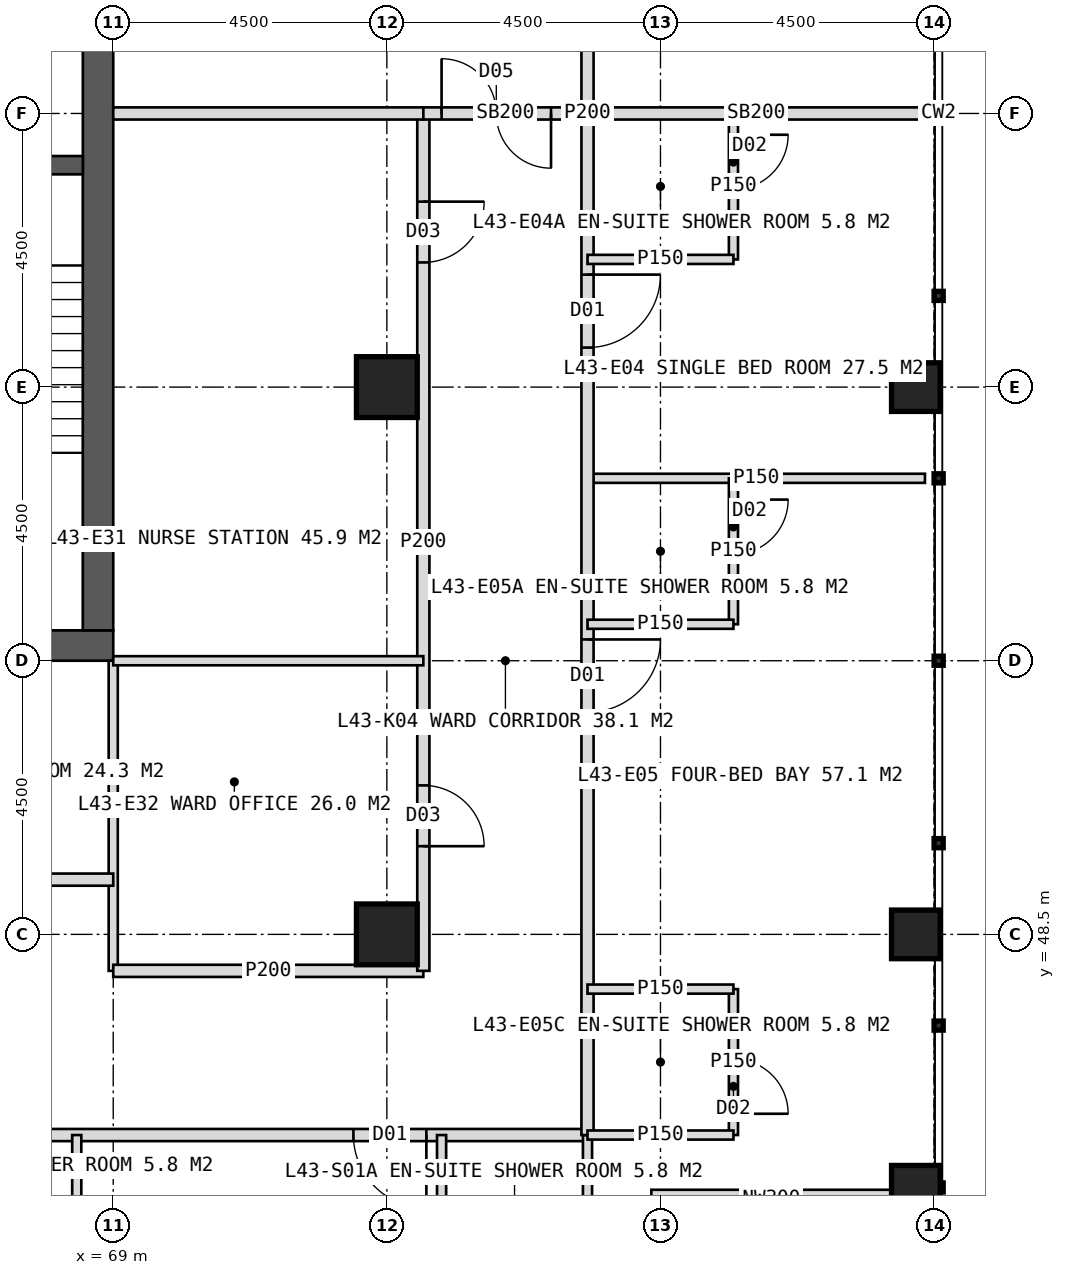
"""IFC4 building model, lengths in metres.
Left out: names, types, materials, properties, quantities, classifications, styles, units other than length and angle.
Written with IfcOpenShell. Run it as: python <this file> out.ifc"""

import sys

from ifc_helpers import new_model, si_unit, direction, frame, frame_2d, origin, origin_2d, place, context, subcontext, project, spatial, rectangle, hollow_rectangle, extrude, element, fill, save


model = new_model("IFC4")
c1 = context("Model", 3, precision=1e-05, world=origin(), true_north=direction((0.0, 1.0)))
c2 = subcontext(c1, "Body", "Model", "MODEL_VIEW")
j1 = project(units=[si_unit("LENGTHUNIT", "METRE"), si_unit("PLANEANGLEUNIT", "RADIAN")], contexts=[c1])
p1 = place(None, origin())
s1 = spatial("IfcSite", under=j1, at=p1, CompositionType="ELEMENT")
p2 = place(p1, origin())
s2 = spatial("IfcBuilding", under=s1, at=p2, CompositionType="ELEMENT")
p3 = place(p2, frame((0.0, 0.0, 181.0)))
s3 = spatial("IfcBuildingStorey", under=s2, at=p3, CompositionType="ELEMENT", Elevation=181.0)
p4 = place(p3, frame((51.0, 53.25, 0.0), z_axis=(0.0, 0.0, 1.0), x_axis=(1.0, 0.0, 0.0)))
e1 = element("IfcWall", 1, at=p4, inside=s3, PredefinedType="SHEAR", context=c2, shape_type="SweptSolid", body=[
    extrude(rectangle(XDim=18.0, YDim=0.5, at=frame_2d((9.0, 0.0))), origin(), (0.0, 0.0, 1.0), 4.0),
])
p5 = place(p4, frame((8.1, 0.0, 0.0)))
e2 = element("IfcOpeningElement", 2, at=p5, cuts=e1, PredefinedType="OPENING", context=c2, shape_type="SweptSolid", body=[
    extrude(rectangle(XDim=1.8, YDim=2.2, at=frame_2d((0.9, 1.1))), frame((0.0, 0.26, 0.0), z_axis=(0.0, -1.0, 0.0), x_axis=(1.0, 0.0, 0.0)), (0.0, 0.0, 1.0), 0.52),
])
p6 = place(p3, frame((68.75, 53.5, 0.0), z_axis=(0.0, 0.0, 1.0), x_axis=(0.0, 1.0, 0.0)))
e3 = element("IfcWall", 3, at=p6, inside=s3, PredefinedType="SHEAR", context=c2, shape_type="SweptSolid", body=[
    extrude(rectangle(XDim=17.0, YDim=0.5, at=frame_2d((8.5, 0.0))), origin(), (0.0, 0.0, 1.0), 4.0),
])
p7 = place(p6, frame((9.6, 0.0, 0.0)))
e4 = element("IfcOpeningElement", 4, at=p7, cuts=e3, PredefinedType="OPENING", context=c2, shape_type="SweptSolid", body=[
    extrude(rectangle(XDim=1.5, YDim=2.2, at=frame_2d((0.75, 1.1))), frame((0.0, 0.26, 0.0), z_axis=(0.0, -1.0, 0.0), x_axis=(1.0, 0.0, 0.0)), (0.0, 0.0, 1.0), 0.52),
])
p8 = place(p3, frame((65.2, 61.15, 0.0), z_axis=(0.0, 0.0, 1.0), x_axis=(1.0, 0.0, 0.0)))
e5 = element("IfcWall", 5, at=p8, inside=s3, PredefinedType="SHEAR", context=c2, shape_type="SweptSolid", body=[
    extrude(rectangle(XDim=3.3, YDim=0.3, at=frame_2d((1.65, 0.0))), origin(), (0.0, 0.0, 1.0), 4.0),
])
p9 = place(p8, frame((1.05, 0.0, 0.0)))
e6 = element("IfcOpeningElement", 6, at=p9, cuts=e5, PredefinedType="OPENING", context=c2, shape_type="SweptSolid", body=[
    extrude(rectangle(XDim=1.2, YDim=2.1, at=frame_2d((0.6, 1.05))), frame((0.0, 0.16, 0.0), z_axis=(0.0, -1.0, 0.0), x_axis=(1.0, 0.0, 0.0)), (0.0, 0.0, 1.0), 0.32),
])
for number, where, z_axis, x_axis in (
    (7, (73.5, 48.5, 0.0), (0.0, 0.0, 1.0), (1.0, 0.0, 0.0)),
    (8, (73.5, 57.5, 0.0), (0.0, 0.0, 1.0), (1.0, 0.0, 0.0)),
):
    element("IfcColumn", number, at=place(p3, frame(where, z_axis=z_axis, x_axis=x_axis)), inside=s3, PredefinedType="COLUMN", context=c2, shape_type="SweptSolid", body=[
        extrude(hollow_rectangle(XDim=1.0, YDim=1.0, WallThickness=0.1, at=origin_2d()), origin(), (0.0, 0.0, 1.0), 4.0),
    ])
for number, where, z_axis, x_axis in (
    (9, (82.2, 44.3, 0.0), (0.0, 0.0, 1.0), (1.0, 0.0, 0.0)),
    (10, (82.2, 48.5, 0.0), (0.0, 0.0, 1.0), (1.0, 0.0, 0.0)),
    (11, (82.2, 57.5, 0.0), (0.0, 0.0, 1.0), (1.0, 0.0, 0.0)),
):
    element("IfcColumn", number, at=place(p3, frame(where, z_axis=z_axis, x_axis=x_axis)), inside=s3, PredefinedType="COLUMN", context=c2, shape_type="SweptSolid", body=[
        extrude(hollow_rectangle(XDim=0.8, YDim=0.8, WallThickness=0.08, at=origin_2d()), origin(), (0.0, 0.0, 1.0), 4.0),
    ])
p10 = place(p3, frame((81.8, 44.15, 0.0), z_axis=(0.0, 0.0, 1.0), x_axis=(-1.0, 0.0, 0.0)))
e12 = element("IfcWall", 12, at=p10, inside=s3, PredefinedType="ELEMENTEDWALL", context=c2, shape_type="SweptSolid", body=[
    extrude(rectangle(XDim=3.95, YDim=0.3, at=frame_2d((1.975, 0.0))), origin(), (0.0, 0.0, 1.0), 2.85),
])
p11 = place(p3, frame((76.8, 45.2, 0.0), z_axis=(0.0, 0.0, 1.0), x_axis=(-1.0, 0.0, 0.0)))
e13 = element("IfcWall", 13, at=p11, inside=s3, PredefinedType="PARTITIONING", context=c2, shape_type="SweptSolid", body=[
    extrude(rectangle(XDim=33.6, YDim=0.2, at=frame_2d((16.8, 0.0))), origin(), (0.0, 0.0, 1.0), 3.75),
])
p12 = place(p11, frame((2.65, 0.0, 0.0)))
e14 = element("IfcOpeningElement", 14, at=p12, cuts=e13, PredefinedType="OPENING", context=c2, shape_type="SweptSolid", body=[
    extrude(rectangle(XDim=1.2, YDim=2.2, at=frame_2d((0.6, 1.1))), frame((0.0, 0.11, 0.0), z_axis=(0.0, -1.0, 0.0), x_axis=(1.0, 0.0, 0.0)), (0.0, 0.0, 1.0), 0.22),
])
p13 = place(p11, frame((14.05, 0.0, 0.0)))
e15 = element("IfcOpeningElement", 15, at=p13, cuts=e13, PredefinedType="OPENING", context=c2, shape_type="SweptSolid", body=[
    extrude(rectangle(XDim=1.2, YDim=2.2, at=frame_2d((0.6, 1.1))), frame((0.0, 0.11, 0.0), z_axis=(0.0, -1.0, 0.0), x_axis=(1.0, 0.0, 0.0)), (0.0, 0.0, 1.0), 0.22),
])
p14 = place(p11, frame((22.45, 0.0, 0.0)))
e16 = element("IfcOpeningElement", 16, at=p14, cuts=e13, PredefinedType="OPENING", context=c2, shape_type="SweptSolid", body=[
    extrude(rectangle(XDim=1.2, YDim=2.2, at=frame_2d((0.6, 1.1))), frame((0.0, 0.11, 0.0), z_axis=(0.0, -1.0, 0.0), x_axis=(1.0, 0.0, 0.0)), (0.0, 0.0, 1.0), 0.22),
])
p15 = place(p3, frame((76.8, 45.2, 0.0), z_axis=(0.0, 0.0, 1.0), x_axis=(0.0, -1.0, 0.0)))
e17 = element("IfcWall", 17, at=p15, inside=s3, PredefinedType="PARTITIONING", context=c2, shape_type="SweptSolid", body=[
    extrude(rectangle(XDim=5.55, YDim=0.15, at=frame_2d((2.775, 0.0))), origin(), (0.0, 0.0, 1.0), 3.75),
])
for number, where, z_axis, x_axis in (
    (18, (74.4, 45.2, 0.0), (0.0, 0.0, 1.0), (0.0, -1.0, 0.0)),
    (19, (68.4, 45.2, 0.0), (0.0, 0.0, 1.0), (0.0, -1.0, 0.0)),
):
    element("IfcWall", number, at=place(p3, frame(where, z_axis=z_axis, x_axis=x_axis)), inside=s3, PredefinedType="PARTITIONING", context=c2, shape_type="SweptSolid", body=[
        extrude(rectangle(XDim=2.4, YDim=0.15, at=frame_2d((1.2, 0.0))), origin(), (0.0, 0.0, 1.0), 3.75),
    ])
p16 = place(p3, frame((69.0, 53.0, 0.0), z_axis=(0.0, 0.0, 1.0), x_axis=(0.0, -1.0, 0.0)))
e20 = element("IfcWall", 20, at=p16, inside=s3, PredefinedType="PARTITIONING", context=c2, shape_type="SweptSolid", body=[
    extrude(rectangle(XDim=5.1, YDim=0.15, at=frame_2d((2.55, 0.0))), origin(), (0.0, 0.0, 1.0), 3.75),
])
p17 = place(p3, frame((74.1, 47.9, 0.0), z_axis=(0.0, 0.0, 1.0), x_axis=(-1.0, 0.0, 0.0)))
e21 = element("IfcWall", 21, at=p17, inside=s3, PredefinedType="PARTITIONING", context=c2, shape_type="SweptSolid", body=[
    extrude(rectangle(XDim=5.1, YDim=0.2, at=frame_2d((2.55, 0.0))), origin(), (0.0, 0.0, 1.0), 3.75),
])
p18 = place(p3, frame((69.0, 49.4, 0.0), z_axis=(0.0, 0.0, 1.0), x_axis=(-1.0, 0.0, 0.0)))
e22 = element("IfcWall", 22, at=p18, inside=s3, PredefinedType="PARTITIONING", context=c2, shape_type="SweptSolid", body=[
    extrude(rectangle(XDim=6.75, YDim=0.2, at=frame_2d((3.375, 0.0))), origin(), (0.0, 0.0, 1.0), 3.75),
])
p19 = place(p18, frame((1.45, 0.0, 0.0)))
e23 = element("IfcOpeningElement", 23, at=p19, cuts=e22, PredefinedType="OPENING", context=c2, shape_type="SweptSolid", body=[
    extrude(rectangle(XDim=1.0, YDim=2.1, at=frame_2d((0.5, 1.05))), frame((0.0, 0.11, 0.0), z_axis=(0.0, -1.0, 0.0), x_axis=(1.0, 0.0, 0.0)), (0.0, 0.0, 1.0), 0.22),
])
p20 = place(p3, frame((76.8, 62.0, 0.0), z_axis=(0.0, 0.0, 1.0), x_axis=(1.0, 0.0, 0.0)))
e24 = element("IfcWall", 24, at=p20, inside=s3, PredefinedType="SOLIDWALL", context=c2, shape_type="SweptSolid", body=[
    extrude(rectangle(XDim=5.55, YDim=0.2, at=frame_2d((2.775, 0.0))), origin(), (0.0, 0.0, 1.0), 2.95),
])
p21 = place(p3, frame((76.8, 56.0, 0.0), z_axis=(0.0, 0.0, 1.0), x_axis=(1.0, 0.0, 0.0)))
e25 = element("IfcWall", 25, at=p21, inside=s3, PredefinedType="PARTITIONING", context=c2, shape_type="SweptSolid", body=[
    extrude(rectangle(XDim=5.55, YDim=0.15, at=frame_2d((2.775, 0.0))), origin(), (0.0, 0.0, 1.0), 3.75),
])
p22 = place(p3, frame((76.8, 78.8, 0.0), z_axis=(0.0, 0.0, 1.0), x_axis=(0.0, -1.0, 0.0)))
e26 = element("IfcWall", 26, at=p22, inside=s3, PredefinedType="PARTITIONING", context=c2, shape_type="SweptSolid", body=[
    extrude(rectangle(XDim=33.6, YDim=0.2, at=frame_2d((16.8, 0.0))), origin(), (0.0, 0.0, 1.0), 3.75),
])
p23 = place(p22, frame((2.65, 0.0, 0.0)))
e27 = element("IfcOpeningElement", 27, at=p23, cuts=e26, PredefinedType="OPENING", context=c2, shape_type="SweptSolid", body=[
    extrude(rectangle(XDim=1.2, YDim=2.2, at=frame_2d((0.6, 1.1))), frame((0.0, 0.11, 0.0), z_axis=(0.0, -1.0, 0.0), x_axis=(1.0, 0.0, 0.0)), (0.0, 0.0, 1.0), 0.22),
])
p24 = place(p22, frame((7.45, 0.0, 0.0)))
e28 = element("IfcOpeningElement", 28, at=p24, cuts=e26, PredefinedType="OPENING", context=c2, shape_type="SweptSolid", body=[
    extrude(rectangle(XDim=1.2, YDim=2.2, at=frame_2d((0.6, 1.1))), frame((0.0, 0.11, 0.0), z_axis=(0.0, -1.0, 0.0), x_axis=(1.0, 0.0, 0.0)), (0.0, 0.0, 1.0), 0.22),
])
p25 = place(p22, frame((13.45, 0.0, 0.0)))
e29 = element("IfcOpeningElement", 29, at=p25, cuts=e26, PredefinedType="OPENING", context=c2, shape_type="SweptSolid", body=[
    extrude(rectangle(XDim=1.2, YDim=2.2, at=frame_2d((0.6, 1.1))), frame((0.0, 0.11, 0.0), z_axis=(0.0, -1.0, 0.0), x_axis=(1.0, 0.0, 0.0)), (0.0, 0.0, 1.0), 0.22),
])
p26 = place(p22, frame((19.45, 0.0, 0.0)))
e30 = element("IfcOpeningElement", 30, at=p26, cuts=e26, PredefinedType="OPENING", context=c2, shape_type="SweptSolid", body=[
    extrude(rectangle(XDim=1.2, YDim=2.2, at=frame_2d((0.6, 1.1))), frame((0.0, 0.11, 0.0), z_axis=(0.0, -1.0, 0.0), x_axis=(1.0, 0.0, 0.0)), (0.0, 0.0, 1.0), 0.22),
])
p27 = place(p22, frame((25.45, 0.0, 0.0)))
e31 = element("IfcOpeningElement", 31, at=p27, cuts=e26, PredefinedType="OPENING", context=c2, shape_type="SweptSolid", body=[
    extrude(rectangle(XDim=1.2, YDim=2.2, at=frame_2d((0.6, 1.1))), frame((0.0, 0.11, 0.0), z_axis=(0.0, -1.0, 0.0), x_axis=(1.0, 0.0, 0.0)), (0.0, 0.0, 1.0), 0.22),
])
p28 = place(p3, frame((79.2, 62.0, 0.0), z_axis=(0.0, 0.0, 1.0), x_axis=(0.0, -1.0, 0.0)))
e32 = element("IfcWall", 32, at=p28, inside=s3, PredefinedType="PARTITIONING", context=c2, shape_type="SweptSolid", body=[
    extrude(rectangle(XDim=2.4, YDim=0.15, at=frame_2d((1.2, 0.0))), origin(), (0.0, 0.0, 1.0), 3.75),
])
p29 = place(p28, frame((0.35, 0.0, 0.0)))
e33 = element("IfcOpeningElement", 33, at=p29, cuts=e32, PredefinedType="OPENING", context=c2, shape_type="SweptSolid", body=[
    extrude(rectangle(XDim=0.9, YDim=2.1, at=frame_2d((0.45, 1.05))), frame((0.0, 0.085, 0.0), z_axis=(0.0, -1.0, 0.0), x_axis=(1.0, 0.0, 0.0)), (0.0, 0.0, 1.0), 0.17),
])
p30 = place(p3, frame((76.8, 59.6, 0.0), z_axis=(0.0, 0.0, 1.0), x_axis=(1.0, 0.0, 0.0)))
e34 = element("IfcWall", 34, at=p30, inside=s3, PredefinedType="PARTITIONING", context=c2, shape_type="SweptSolid", body=[
    extrude(rectangle(XDim=2.4, YDim=0.15, at=frame_2d((1.2, 0.0))), origin(), (0.0, 0.0, 1.0), 3.75),
])
p31 = place(p3, frame((79.2, 56.0, 0.0), z_axis=(0.0, 0.0, 1.0), x_axis=(0.0, -1.0, 0.0)))
e35 = element("IfcWall", 35, at=p31, inside=s3, PredefinedType="PARTITIONING", context=c2, shape_type="SweptSolid", body=[
    extrude(rectangle(XDim=2.4, YDim=0.15, at=frame_2d((1.2, 0.0))), origin(), (0.0, 0.0, 1.0), 3.75),
])
p32 = place(p31, frame((0.35, 0.0, 0.0)))
e36 = element("IfcOpeningElement", 36, at=p32, cuts=e35, PredefinedType="OPENING", context=c2, shape_type="SweptSolid", body=[
    extrude(rectangle(XDim=0.9, YDim=2.1, at=frame_2d((0.45, 1.05))), frame((0.0, 0.085, 0.0), z_axis=(0.0, -1.0, 0.0), x_axis=(1.0, 0.0, 0.0)), (0.0, 0.0, 1.0), 0.17),
])
p33 = place(p3, frame((76.8, 53.6, 0.0), z_axis=(0.0, 0.0, 1.0), x_axis=(1.0, 0.0, 0.0)))
e37 = element("IfcWall", 37, at=p33, inside=s3, PredefinedType="PARTITIONING", context=c2, shape_type="SweptSolid", body=[
    extrude(rectangle(XDim=2.4, YDim=0.15, at=frame_2d((1.2, 0.0))), origin(), (0.0, 0.0, 1.0), 3.75),
])
p34 = place(p3, frame((79.2, 47.6, 0.0), z_axis=(0.0, 0.0, 1.0), x_axis=(0.0, -1.0, 0.0)))
e38 = element("IfcWall", 38, at=p34, inside=s3, PredefinedType="PARTITIONING", context=c2, shape_type="SweptSolid", body=[
    extrude(rectangle(XDim=2.4, YDim=0.15, at=frame_2d((1.2, 0.0))), origin(), (0.0, 0.0, 1.0), 3.75),
])
p35 = place(p34, frame((1.15, 0.0, 0.0)))
e39 = element("IfcOpeningElement", 39, at=p35, cuts=e38, PredefinedType="OPENING", context=c2, shape_type="SweptSolid", body=[
    extrude(rectangle(XDim=0.9, YDim=2.1, at=frame_2d((0.45, 1.05))), frame((0.0, 0.085, 0.0), z_axis=(0.0, -1.0, 0.0), x_axis=(1.0, 0.0, 0.0)), (0.0, 0.0, 1.0), 0.17),
])
for number, where, z_axis, x_axis in (
    (40, (76.8, 47.6, 0.0), (0.0, 0.0, 1.0), (1.0, 0.0, 0.0)),
    (41, (76.8, 45.2, 0.0), (0.0, 0.0, 1.0), (1.0, 0.0, 0.0)),
):
    element("IfcWall", number, at=place(p3, frame(where, z_axis=z_axis, x_axis=x_axis)), inside=s3, PredefinedType="PARTITIONING", context=c2, shape_type="SweptSolid", body=[
        extrude(rectangle(XDim=2.4, YDim=0.15, at=frame_2d((1.2, 0.0))), origin(), (0.0, 0.0, 1.0), 3.75),
    ])
p36 = place(p3, frame((74.1, 62.0, 0.0), z_axis=(0.0, 0.0, 1.0), x_axis=(0.0, -1.0, 0.0)))
e42 = element("IfcWall", 42, at=p36, inside=s3, PredefinedType="PARTITIONING", context=c2, shape_type="SweptSolid", body=[
    extrude(rectangle(XDim=14.1, YDim=0.2, at=frame_2d((7.05, 0.0))), origin(), (0.0, 0.0, 1.0), 3.75),
])
p37 = place(p36, frame((1.45, 0.0, 0.0)))
e43 = element("IfcOpeningElement", 43, at=p37, cuts=e42, PredefinedType="OPENING", context=c2, shape_type="SweptSolid", body=[
    extrude(rectangle(XDim=1.0, YDim=2.1, at=frame_2d((0.5, 1.05))), frame((0.0, 0.11, 0.0), z_axis=(0.0, -1.0, 0.0), x_axis=(1.0, 0.0, 0.0)), (0.0, 0.0, 1.0), 0.22),
])
p38 = place(p36, frame((11.05, 0.0, 0.0)))
e44 = element("IfcOpeningElement", 44, at=p38, cuts=e42, PredefinedType="OPENING", context=c2, shape_type="SweptSolid", body=[
    extrude(rectangle(XDim=1.0, YDim=2.1, at=frame_2d((0.5, 1.05))), frame((0.0, 0.11, 0.0), z_axis=(0.0, -1.0, 0.0), x_axis=(1.0, 0.0, 0.0)), (0.0, 0.0, 1.0), 0.22),
])
p39 = place(p3, frame((69.0, 62.0, 0.0), z_axis=(0.0, 0.0, 1.0), x_axis=(1.0, 0.0, 0.0)))
e45 = element("IfcWall", 45, at=p39, inside=s3, PredefinedType="SOLIDWALL", context=c2, shape_type="SweptSolid", body=[
    extrude(rectangle(XDim=5.1, YDim=0.2, at=frame_2d((2.55, 0.0))), origin(), (0.0, 0.0, 1.0), 2.95),
])
p40 = place(p3, frame((69.0, 53.0, 0.0), z_axis=(0.0, 0.0, 1.0), x_axis=(1.0, 0.0, 0.0)))
e46 = element("IfcWall", 46, at=p40, inside=s3, PredefinedType="PARTITIONING", context=c2, shape_type="SweptSolid", body=[
    extrude(rectangle(XDim=5.1, YDim=0.15, at=frame_2d((2.55, 0.0))), origin(), (0.0, 0.0, 1.0), 3.75),
])
p41 = place(p3, frame((74.1, 62.0, 0.0), z_axis=(0.0, 0.0, 1.0), x_axis=(1.0, 0.0, 0.0)))
e47 = element("IfcWall", 47, at=p41, inside=s3, PredefinedType="SOLIDWALL", context=c2, shape_type="SweptSolid", body=[
    extrude(rectangle(XDim=2.7, YDim=0.2, at=frame_2d((1.35, 0.0))), origin(), (0.0, 0.0, 1.0), 2.95),
])
p42 = place(p41, frame((0.3, 0.0, 0.0)))
e48 = element("IfcOpeningElement", 48, at=p42, cuts=e47, PredefinedType="OPENING", context=c2, shape_type="SweptSolid", body=[
    extrude(rectangle(XDim=1.8, YDim=2.2, at=frame_2d((0.9, 1.1))), frame((0.0, 0.11, 0.0), z_axis=(0.0, -1.0, 0.0), x_axis=(1.0, 0.0, 0.0)), (0.0, 0.0, 1.0), 0.22),
])
p43 = place(p12, origin())
e49 = element("IfcDoor", 49, at=p43, inside=s3, OperationType="SINGLE_SWING_LEFT", PredefinedType="DOOR", context=c2, shape_type="SweptSolid", body=[
    extrude(rectangle(XDim=1.2, YDim=2.2, at=frame_2d((0.6, 1.1))), frame((0.0, 0.025, 0.0), z_axis=(0.0, -1.0, 0.0), x_axis=(1.0, 0.0, 0.0)), (0.0, 0.0, 1.0), 0.05),
])
fill(e14, e49)
p44 = place(p26, origin())
e50 = element("IfcDoor", 50, at=p44, inside=s3, OperationType="SINGLE_SWING_LEFT", PredefinedType="DOOR", context=c2, shape_type="SweptSolid", body=[
    extrude(rectangle(XDim=1.2, YDim=2.2, at=frame_2d((0.6, 1.1))), frame((0.0, 0.025, 0.0), z_axis=(0.0, -1.0, 0.0), x_axis=(1.0, 0.0, 0.0)), (0.0, 0.0, 1.0), 0.05),
])
fill(e30, e50)
p45 = place(p29, origin())
e51 = element("IfcDoor", 51, at=p45, inside=s3, OperationType="SINGLE_SWING_LEFT", PredefinedType="DOOR", context=c2, shape_type="SweptSolid", body=[
    extrude(rectangle(XDim=0.9, YDim=2.1, at=frame_2d((0.45, 1.05))), frame((0.0, 0.025, 0.0), z_axis=(0.0, -1.0, 0.0), x_axis=(1.0, 0.0, 0.0)), (0.0, 0.0, 1.0), 0.05),
])
fill(e33, e51)
p46 = place(p27, origin())
e52 = element("IfcDoor", 52, at=p46, inside=s3, OperationType="SINGLE_SWING_LEFT", PredefinedType="DOOR", context=c2, shape_type="SweptSolid", body=[
    extrude(rectangle(XDim=1.2, YDim=2.2, at=frame_2d((0.6, 1.1))), frame((0.0, 0.025, 0.0), z_axis=(0.0, -1.0, 0.0), x_axis=(1.0, 0.0, 0.0)), (0.0, 0.0, 1.0), 0.05),
])
fill(e31, e52)
p47 = place(p32, origin())
e53 = element("IfcDoor", 53, at=p47, inside=s3, OperationType="SINGLE_SWING_LEFT", PredefinedType="DOOR", context=c2, shape_type="SweptSolid", body=[
    extrude(rectangle(XDim=0.9, YDim=2.1, at=frame_2d((0.45, 1.05))), frame((0.0, 0.025, 0.0), z_axis=(0.0, -1.0, 0.0), x_axis=(1.0, 0.0, 0.0)), (0.0, 0.0, 1.0), 0.05),
])
fill(e36, e53)
p48 = place(p35, origin())
e54 = element("IfcDoor", 54, at=p48, inside=s3, OperationType="SINGLE_SWING_RIGHT", PredefinedType="DOOR", context=c2, shape_type="SweptSolid", body=[
    extrude(rectangle(XDim=0.9, YDim=2.1, at=frame_2d((0.45, 1.05))), frame((0.0, 0.025, 0.0), z_axis=(0.0, -1.0, 0.0), x_axis=(1.0, 0.0, 0.0)), (0.0, 0.0, 1.0), 0.05),
])
fill(e39, e54)
p49 = place(p37, origin())
e55 = element("IfcDoor", 55, at=p49, inside=s3, OperationType="SINGLE_SWING_LEFT", PredefinedType="DOOR", context=c2, shape_type="SweptSolid", body=[
    extrude(rectangle(XDim=1.0, YDim=2.1, at=frame_2d((0.5, 1.05))), frame((0.0, 0.025, 0.0), z_axis=(0.0, -1.0, 0.0), x_axis=(1.0, 0.0, 0.0)), (0.0, 0.0, 1.0), 0.05),
])
fill(e43, e55)
p50 = place(p38, origin())
e56 = element("IfcDoor", 56, at=p50, inside=s3, OperationType="SINGLE_SWING_RIGHT", PredefinedType="DOOR", context=c2, shape_type="SweptSolid", body=[
    extrude(rectangle(XDim=1.0, YDim=2.1, at=frame_2d((0.5, 1.05))), frame((0.0, 0.025, 0.0), z_axis=(0.0, -1.0, 0.0), x_axis=(1.0, 0.0, 0.0)), (0.0, 0.0, 1.0), 0.05),
])
fill(e44, e56)
p51 = place(p42, origin())
e57 = element("IfcDoor", 57, at=p51, inside=s3, OperationType="DOUBLE_DOOR_DOUBLE_SWING", PredefinedType="DOOR", context=c2, shape_type="SweptSolid", body=[
    extrude(rectangle(XDim=1.8, YDim=2.2, at=frame_2d((0.9, 1.1))), frame((0.0, 0.025, 0.0), z_axis=(0.0, -1.0, 0.0), x_axis=(1.0, 0.0, 0.0)), (0.0, 0.0, 1.0), 0.05),
])
fill(e48, e57)
save(model, sys.argv[1])
